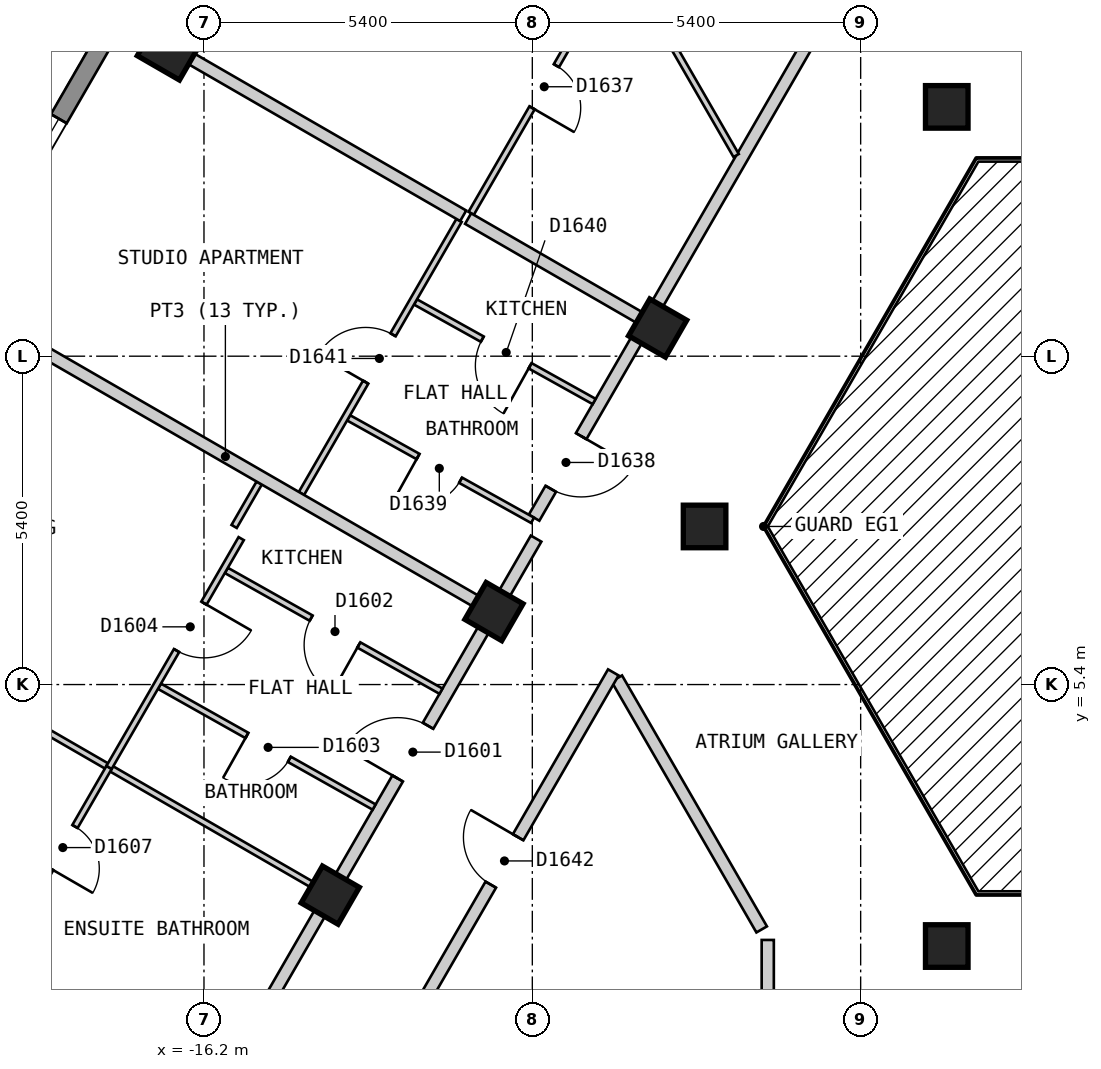
"""IFC4 building model, lengths in metres.
Left out: names, types, materials, properties, quantities, classifications, styles, units other than length and angle.
Written with IfcOpenShell. Run it as: python <this file> out.ifc"""

import sys

from ifc_helpers import new_model, si_unit, direction, frame, frame_2d, origin, origin_2d, place, context, subcontext, project, spatial, polyline, rectangle, outline, extrude, element, fill, save


model = new_model("IFC4")
c1 = context("Model", 3, precision=1e-05, world=origin(), true_north=direction((0.0, 1.0)))
c2 = subcontext(c1, "Body", "Model", "MODEL_VIEW")
j1 = project(units=[si_unit("LENGTHUNIT", "METRE"), si_unit("PLANEANGLEUNIT", "RADIAN")], contexts=[c1])
p1 = place(None, origin())
s1 = spatial("IfcSite", under=j1, at=p1, CompositionType="ELEMENT")
p2 = place(p1, origin())
s2 = spatial("IfcBuilding", under=s1, at=p2, CompositionType="ELEMENT")
p3 = place(p2, frame((0.0, 0.0, 169.2)))
s3 = spatial("IfcBuildingStorey", under=s2, at=p3, CompositionType="ELEMENT", Elevation=169.2)
p4 = place(p3, frame((-16.75, 15.888, 0.0), z_axis=(0.0, 0.0, 1.0), x_axis=(-0.5, -0.866025403784, 0.0)))
e1 = element("IfcColumn", 1, at=p4, inside=s3, PredefinedType="COLUMN", context=c2, shape_type="SweptSolid", body=[
    extrude(rectangle(XDim=0.8, YDim=0.8, at=origin_2d()), origin(), (0.0, 0.0, 1.0), 3.0),
])
for number, where, z_axis, x_axis in (
    (2, (-3.984, 14.9, 0.0), (0.0, 0.0, 1.0), (1.0, 0.0, 0.0)),
    (3, (-8.739, 11.263, 0.0), (0.0, 0.0, 1.0), (-0.5, -0.866, 0.0)),
    (4, (-7.967, 8.0, 0.0), (0.0, 0.0, 1.0), (1.0, 0.0, 0.0)),
    (5, (-11.431, 6.6, 0.0), (0.0, 0.0, 1.0), (-0.5, -0.866, 0.0)),
    (6, (-3.984, 1.1, 0.0), (0.0, 0.0, 1.0), (1.0, 0.0, 0.0)),
    (7, (-14.123, 1.937, 0.0), (0.0, 0.0, 1.0), (-0.5, -0.866, 0.0)),
):
    element("IfcColumn", number, at=place(p3, frame(where, z_axis=z_axis, x_axis=x_axis)), inside=s3, PredefinedType="COLUMN", context=c2, shape_type="SweptSolid", body=[
        extrude(rectangle(XDim=0.7, YDim=0.7, at=origin_2d()), origin(), (0.0, 0.0, 1.0), 3.0),
    ])
p5 = place(p3, frame((-14.592, 21.625, 0.0), z_axis=(0.0, 0.0, 1.0), x_axis=(-0.500010537973, -0.866019319597, 0.0)))
e8 = element("IfcWall", 8, at=p5, inside=s3, PredefinedType="SOLIDWALL", context=c2, shape_type="SweptSolid", body=[
    extrude(outline(polyline([(0.0, -0.15), (22.863, -0.15), (22.783, 0.15), (0.08, 0.15), (0.0, -0.15)])), origin(), (0.0, 0.0, 1.0), 2.7),
])
p6 = place(p5, frame((2.606, 0.0, 0.15)))
e9 = element("IfcOpeningElement", 9, at=p6, cuts=e8, PredefinedType="OPENING", context=c2, shape_type="SweptSolid", body=[
    extrude(rectangle(XDim=1.5, YDim=2.1, at=frame_2d((0.75, 1.05))), frame((0.0, 0.16, 0.0), z_axis=(0.0, -1.0, 0.0), x_axis=(1.0, 0.0, 0.0)), (0.0, 0.0, 1.0), 0.32),
])
p7 = place(p5, frame((7.99, 0.0, 0.15)))
e10 = element("IfcOpeningElement", 10, at=p7, cuts=e8, PredefinedType="OPENING", context=c2, shape_type="SweptSolid", body=[
    extrude(rectangle(XDim=1.5, YDim=2.1, at=frame_2d((0.75, 1.05))), frame((0.0, 0.16, 0.0), z_axis=(0.0, -1.0, 0.0), x_axis=(1.0, 0.0, 0.0)), (0.0, 0.0, 1.0), 0.32),
])
p8 = place(p5, frame((13.373, 0.0, 0.15)))
e11 = element("IfcOpeningElement", 11, at=p8, cuts=e8, PredefinedType="OPENING", context=c2, shape_type="SweptSolid", body=[
    extrude(rectangle(XDim=1.5, YDim=2.1, at=frame_2d((0.75, 1.05))), frame((0.0, 0.16, 0.0), z_axis=(0.0, -1.0, 0.0), x_axis=(1.0, 0.0, 0.0)), (0.0, 0.0, 1.0), 0.32),
])
p9 = place(p5, frame((18.758, 0.0, 0.15)))
e12 = element("IfcOpeningElement", 12, at=p9, cuts=e8, PredefinedType="OPENING", context=c2, shape_type="SweptSolid", body=[
    extrude(rectangle(XDim=1.5, YDim=2.1, at=frame_2d((0.75, 1.05))), frame((0.0, 0.16, 0.0), z_axis=(0.0, -1.0, 0.0), x_axis=(1.0, 0.0, 0.0)), (0.0, 0.0, 1.0), 0.32),
])
p10 = place(p3, frame((-9.411, 5.5, 0.0), z_axis=(0.0, 0.0, 1.0), x_axis=(0.500018099276, -0.86601495391, 0.0)))
e13 = element("IfcWall", 13, at=p10, inside=s3, PredefinedType="PARTITIONING", context=c2, shape_type="SweptSolid", body=[
    extrude(rectangle(XDim=4.765, YDim=0.2, at=frame_2d((2.383, 0.0))), origin(), (0.0, 0.0, 1.0), 2.7),
])
p11 = place(p3, frame((-13.048, -0.601, 0.0), z_axis=(0.0, 0.0, 1.0), x_axis=(0.499982180423, 0.866035691677, 0.0)))
e14 = element("IfcWall", 14, at=p11, inside=s3, PredefinedType="PARTITIONING", context=c2, shape_type="SweptSolid", body=[
    extrude(rectangle(XDim=7.16, YDim=0.2, at=frame_2d((3.58, 0.0))), origin(), (0.0, 0.0, 1.0), 2.7),
])
p12 = place(p11, frame((3.13, 0.0, 0.0)))
e15 = element("IfcOpeningElement", 15, at=p12, cuts=e14, PredefinedType="OPENING", context=c2, shape_type="SweptSolid", body=[
    extrude(rectangle(XDim=0.9, YDim=2.1, at=frame_2d((0.45, 1.05))), frame((0.0, 0.11, 0.0), z_axis=(0.0, -1.0, 0.0), x_axis=(1.0, 0.0, 0.0)), (0.0, 0.0, 1.0), 0.22),
])
p13 = place(p3, frame((-15.53, -0.501, 0.0), z_axis=(0.0, 0.0, 1.0), x_axis=(0.499952498232, 0.866052827206, 0.0)))
e16 = element("IfcWall", 16, at=p13, inside=s3, PredefinedType="PARTITIONING", context=c2, shape_type="SweptSolid", body=[
    extrude(rectangle(XDim=9.585, YDim=0.2, at=frame_2d((4.792, 0.0))), origin(), (0.0, 0.0, 1.0), 2.7),
])
p14 = place(p13, frame((5.031, 0.0, 0.0)))
e17 = element("IfcOpeningElement", 17, at=p14, cuts=e16, PredefinedType="OPENING", context=c2, shape_type="SweptSolid", body=[
    extrude(rectangle(XDim=1.0, YDim=2.1, at=frame_2d((0.5, 1.05))), frame((0.0, 0.11, 0.0), z_axis=(0.0, -1.0, 0.0), x_axis=(1.0, 0.0, 0.0)), (0.0, 0.0, 1.0), 0.22),
])
p15 = place(p3, frame((-10.771, 8.144, 0.0), z_axis=(0.0, 0.0, 1.0), x_axis=(0.500008507724, 0.866020491792, 0.0)))
e18 = element("IfcWall", 18, at=p15, inside=s3, PredefinedType="PARTITIONING", context=c2, shape_type="SweptSolid", body=[
    extrude(rectangle(XDim=10.688, YDim=0.2, at=frame_2d((5.344, 0.0))), origin(), (0.0, 0.0, 1.0), 2.7),
])
p16 = place(p15, frame((9.692, 0.0, 0.0)))
e19 = element("IfcOpeningElement", 19, at=p16, cuts=e18, PredefinedType="OPENING", context=c2, shape_type="SweptSolid", body=[
    extrude(rectangle(XDim=0.8, YDim=2.1, at=frame_2d((0.4, 1.05))), frame((0.0, 0.11, 0.0), z_axis=(0.0, -1.0, 0.0), x_axis=(1.0, 0.0, 0.0)), (0.0, 0.0, 1.0), 0.22),
])
p17 = place(p15, frame((0.549, 0.0, 0.0)))
e20 = element("IfcOpeningElement", 20, at=p17, cuts=e18, PredefinedType="OPENING", context=c2, shape_type="SweptSolid", body=[
    extrude(rectangle(XDim=1.0, YDim=2.1, at=frame_2d((0.5, 1.05))), frame((0.0, 0.11, 0.0), z_axis=(0.0, -1.0, 0.0), x_axis=(1.0, 0.0, 0.0)), (0.0, 0.0, 1.0), 0.22),
])
p18 = place(p3, frame((-6.928, -2.8, 0.0), z_axis=(0.0, 0.0, 1.0), x_axis=(0.0, 1.0, 0.0)))
e21 = element("IfcWall", 21, at=p18, inside=s3, PredefinedType="PARTITIONING", context=c2, shape_type="SweptSolid", body=[
    extrude(rectangle(XDim=4.0, YDim=0.2, at=frame_2d((2.0, 0.0))), origin(), (0.0, 0.0, 1.0), 2.7),
])
p19 = place(p3, frame((-12.721, 11.692, 0.0), z_axis=(0.0, 0.0, 1.0), x_axis=(0.873557394398, -0.486721150859, 0.0)))
e22 = element("IfcWall", 22, at=p19, inside=s3, PredefinedType="PARTITIONING", context=c2, shape_type="SweptSolid", body=[
    extrude(rectangle(XDim=3.363, YDim=0.1, at=frame_2d((1.682, 0.0))), origin(), (0.0, 0.0, 1.0), 2.7),
])
p20 = place(p19, frame((1.257, 0.0, 0.0)))
e23 = element("IfcOpeningElement", 23, at=p20, cuts=e22, PredefinedType="OPENING", context=c2, shape_type="SweptSolid", body=[
    extrude(rectangle(XDim=0.9, YDim=2.1, at=frame_2d((0.45, 1.05))), frame((0.0, 0.06, 0.0), z_axis=(0.0, -1.0, 0.0), x_axis=(1.0, 0.0, 0.0)), (0.0, 0.0, 1.0), 0.12),
])
p21 = place(p3, frame((-13.821, 9.786, 0.0), z_axis=(0.0, 0.0, 1.0), x_axis=(0.873644620966, -0.486564565353, 0.0)))
e24 = element("IfcWall", 24, at=p21, inside=s3, PredefinedType="PARTITIONING", context=c2, shape_type="SweptSolid", body=[
    extrude(rectangle(XDim=3.463, YDim=0.1, at=frame_2d((1.731, 0.0))), origin(), (0.0, 0.0, 1.0), 2.7),
])
p22 = place(p21, frame((1.307, 0.0, 0.0)))
e25 = element("IfcOpeningElement", 25, at=p22, cuts=e24, PredefinedType="OPENING", context=c2, shape_type="SweptSolid", body=[
    extrude(rectangle(XDim=0.8, YDim=2.1, at=frame_2d((0.4, 1.05))), frame((0.0, 0.06, 0.0), z_axis=(0.0, -1.0, 0.0), x_axis=(1.0, 0.0, 0.0)), (0.0, 0.0, 1.0), 0.12),
])
p23 = place(p3, frame((-16.932, 5.372, 0.0), z_axis=(0.0, 0.0, 1.0), x_axis=(0.871514356952, -0.490369988505, 0.0)))
e26 = element("IfcWall", 26, at=p23, inside=s3, PredefinedType="PARTITIONING", context=c2, shape_type="SweptSolid", body=[
    extrude(rectangle(XDim=4.05, YDim=0.1, at=frame_2d((2.025, 0.0))), origin(), (0.0, 0.0, 1.0), 2.7),
])
p24 = place(p23, frame((1.65, 0.0, 0.0)))
e27 = element("IfcOpeningElement", 27, at=p24, cuts=e26, PredefinedType="OPENING", context=c2, shape_type="SweptSolid", body=[
    extrude(rectangle(XDim=0.8, YDim=2.1, at=frame_2d((0.4, 1.05))), frame((0.0, 0.06, 0.0), z_axis=(0.0, -1.0, 0.0), x_axis=(1.0, 0.0, 0.0)), (0.0, 0.0, 1.0), 0.12),
])
p25 = place(p3, frame((-15.832, 7.277, 0.0), z_axis=(0.0, 0.0, 1.0), x_axis=(0.871528850672, -0.490344228523, 0.0)))
e28 = element("IfcWall", 28, at=p25, inside=s3, PredefinedType="PARTITIONING", context=c2, shape_type="SweptSolid", body=[
    extrude(rectangle(XDim=4.05, YDim=0.1, at=frame_2d((2.025, 0.0))), origin(), (0.0, 0.0, 1.0), 2.7),
])
p26 = place(p25, frame((1.6, 0.0, 0.0)))
e29 = element("IfcOpeningElement", 29, at=p26, cuts=e28, PredefinedType="OPENING", context=c2, shape_type="SweptSolid", body=[
    extrude(rectangle(XDim=0.9, YDim=2.1, at=frame_2d((0.45, 1.05))), frame((0.0, 0.06, 0.0), z_axis=(0.0, -1.0, 0.0), x_axis=(1.0, 0.0, 0.0)), (0.0, 0.0, 1.0), 0.12),
])
p27 = place(p3, frame((-22.87, 6.987, 0.0), z_axis=(0.0, 0.0, 1.0), x_axis=(0.866022959057, -0.500004234368, 0.0)))
e30 = element("IfcWall", 30, at=p27, inside=s3, PredefinedType="PARTITIONING", context=c2, shape_type="SweptSolid", body=[
    extrude(rectangle(XDim=10.0, YDim=0.1, at=frame_2d((5.0, 0.0))), origin(), (0.0, 0.0, 1.0), 2.7),
])
p28 = place(p27, frame((2.5, 0.0, 0.0)))
e31 = element("IfcOpeningElement", 31, at=p28, cuts=e30, PredefinedType="OPENING", context=c2, shape_type="SweptSolid", body=[
    extrude(rectangle(XDim=0.9, YDim=2.1, at=frame_2d((0.45, 1.05))), frame((0.0, 0.06, 0.0), z_axis=(0.0, -1.0, 0.0), x_axis=(1.0, 0.0, 0.0)), (0.0, 0.0, 1.0), 0.12),
])
p29 = place(p3, frame((-11.806, 13.149, 0.0), z_axis=(0.0, 0.0, 1.0), x_axis=(0.499932199895, 0.866064544655, 0.0)))
e32 = element("IfcWall", 32, at=p29, inside=s3, PredefinedType="PARTITIONING", context=c2, shape_type="SweptSolid", body=[
    extrude(rectangle(XDim=8.833, YDim=0.1, at=frame_2d((4.417, 0.0))), origin(), (0.0, 0.0, 1.0), 2.7),
])
p30 = place(p29, frame((6.413, 0.0, 0.0)))
e33 = element("IfcOpeningElement", 33, at=p30, cuts=e32, PredefinedType="OPENING", context=c2, shape_type="SweptSolid", body=[
    extrude(rectangle(XDim=0.9, YDim=2.1, at=frame_2d((0.45, 1.05))), frame((0.0, 0.06, 0.0), z_axis=(0.0, -1.0, 0.0), x_axis=(1.0, 0.0, 0.0)), (0.0, 0.0, 1.0), 0.12),
])
p31 = place(p29, frame((2.004, 0.0, 0.0)))
e34 = element("IfcOpeningElement", 34, at=p31, cuts=e32, PredefinedType="OPENING", context=c2, shape_type="SweptSolid", body=[
    extrude(rectangle(XDim=0.8, YDim=2.1, at=frame_2d((0.4, 1.05))), frame((0.0, 0.06, 0.0), z_axis=(0.0, -1.0, 0.0), x_axis=(1.0, 0.0, 0.0)), (0.0, 0.0, 1.0), 0.12),
])
p32 = place(p3, frame((-14.597, 8.543, 0.0), z_axis=(0.0, 0.0, 1.0), x_axis=(0.499962957901, 0.866046788994, 0.0)))
e35 = element("IfcWall", 35, at=p32, inside=s3, PredefinedType="PARTITIONING", context=c2, shape_type="SweptSolid", body=[
    extrude(rectangle(XDim=5.185, YDim=0.1, at=frame_2d((2.592, 0.0))), origin(), (0.0, 0.0, 1.0), 2.7),
])
p33 = place(p32, frame((2.113, 0.0, 0.0)))
e36 = element("IfcOpeningElement", 36, at=p33, cuts=e35, PredefinedType="OPENING", context=c2, shape_type="SweptSolid", body=[
    extrude(rectangle(XDim=0.9, YDim=2.1, at=frame_2d((0.45, 1.05))), frame((0.0, 0.06, 0.0), z_axis=(0.0, -1.0, 0.0), x_axis=(1.0, 0.0, 0.0)), (0.0, 0.0, 1.0), 0.12),
])
p34 = place(p3, frame((-19.283, 1.4, 0.0), z_axis=(0.0, 0.0, 1.0), x_axis=(0.499847391584, 0.866113494368, 0.0)))
e37 = element("IfcWall", 37, at=p34, inside=s3, PredefinedType="PARTITIONING", context=c2, shape_type="SweptSolid", body=[
    extrude(rectangle(XDim=3.045, YDim=0.1, at=frame_2d((1.522, 0.0))), origin(), (0.0, 0.0, 1.0), 2.7),
])
p35 = place(p34, frame((1.123, 0.0, 0.0)))
e38 = element("IfcOpeningElement", 38, at=p35, cuts=e37, PredefinedType="OPENING", context=c2, shape_type="SweptSolid", body=[
    extrude(rectangle(XDim=0.8, YDim=2.1, at=frame_2d((0.4, 1.05))), frame((0.0, 0.06, 0.0), z_axis=(0.0, -1.0, 0.0), x_axis=(1.0, 0.0, 0.0)), (0.0, 0.0, 1.0), 0.12),
])
p36 = place(p3, frame((-15.704, 8.0, 0.0), z_axis=(0.0, 0.0, 1.0), x_axis=(0.499833531678, 0.866121492985, 0.0)))
e39 = element("IfcWall", 39, at=p36, inside=s3, PredefinedType="PARTITIONING", context=c2, shape_type="SweptSolid", body=[
    extrude(rectangle(XDim=0.824, YDim=0.1, at=frame_2d((0.412, 0.0))), origin(), (0.0, 0.0, 1.0), 2.7),
])
p37 = place(p3, frame((-20.178, 11.65, 0.0), z_axis=(0.0, 0.0, 1.0), x_axis=(0.866016855193, -0.500014806302, 0.0)))
e40 = element("IfcWall", 40, at=p37, inside=s3, PredefinedType="PARTITIONING", context=c2, shape_type="SweptSolid", body=[
    extrude(rectangle(XDim=10.0, YDim=0.2, at=frame_2d((5.0, 0.0))), origin(), (0.0, 0.0, 1.0), 2.7),
])
p38 = place(p3, frame((-17.486, 16.313, 0.0), z_axis=(0.0, 0.0, 1.0), x_axis=(0.866002210665, -0.500040169509, 0.0)))
e41 = element("IfcWall", 41, at=p38, inside=s3, PredefinedType="PARTITIONING", context=c2, shape_type="SweptSolid", body=[
    extrude(rectangle(XDim=6.408, YDim=0.2, at=frame_2d((3.204, 0.0))), origin(), (0.0, 0.0, 1.0), 2.7),
])
p39 = place(p3, frame((-11.856, 13.063, 0.0), z_axis=(0.0, 0.0, 1.0), x_axis=(0.865966208357, -0.500102515474, 0.0)))
e42 = element("IfcWall", 42, at=p39, inside=s3, PredefinedType="PARTITIONING", context=c2, shape_type="SweptSolid", body=[
    extrude(rectangle(XDim=3.299, YDim=0.2, at=frame_2d((1.649, 0.0))), origin(), (0.0, 0.0, 1.0), 2.7),
])
p40 = place(p3, frame((-9.352, 17.4, 0.0), z_axis=(0.0, 0.0, 1.0), x_axis=(0.499785326313, -0.866149310225, 0.0)))
e43 = element("IfcWall", 43, at=p40, inside=s3, PredefinedType="PARTITIONING", context=c2, shape_type="SweptSolid", body=[
    extrude(rectangle(XDim=3.81, YDim=0.1, at=frame_2d((1.905, 0.0))), origin(), (0.0, 0.0, 1.0), 2.7),
])
p41 = place(p3, frame((-17.761, 4.037, 0.0), z_axis=(0.0, 0.0, 1.0), x_axis=(0.50009692756, 0.865969435399, 0.0)))
e44 = element("IfcWall", 44, at=p41, inside=s3, PredefinedType="PARTITIONING", context=c2, shape_type="SweptSolid", body=[
    extrude(rectangle(XDim=4.345, YDim=0.1, at=frame_2d((2.173, 0.0))), origin(), (0.0, 0.0, 1.0), 2.7),
])
p42 = place(p41, frame((2.22, 0.0, 0.0)))
e45 = element("IfcOpeningElement", 45, at=p42, cuts=e44, PredefinedType="OPENING", context=c2, shape_type="SweptSolid", body=[
    extrude(rectangle(XDim=0.9, YDim=2.1, at=frame_2d((0.45, 1.05))), frame((0.0, 0.06, 0.0), z_axis=(0.0, -1.0, 0.0), x_axis=(1.0, 0.0, 0.0)), (0.0, 0.0, 1.0), 0.12),
])
p43 = place(p7, origin())
e46 = element("IfcWindow", 46, at=p43, inside=s3, PartitioningType="SINGLE_PANEL", PredefinedType="WINDOW", context=c2, shape_type="SweptSolid", body=[
    extrude(rectangle(XDim=1.5, YDim=2.1, at=frame_2d((0.75, 1.05))), frame((0.0, 0.03, 0.0), z_axis=(0.0, -1.0, 0.0), x_axis=(1.0, 0.0, 0.0)), (0.0, 0.0, 1.0), 0.06),
])
fill(e10, e46)
p44 = place(p14, origin())
e47 = element("IfcDoor", 47, at=p44, inside=s3, OperationType="SINGLE_SWING_LEFT", PredefinedType="DOOR", context=c2, shape_type="SweptSolid", body=[
    extrude(rectangle(XDim=1.0, YDim=2.1, at=frame_2d((0.5, 1.05))), frame((0.0, 0.025, 0.0), z_axis=(0.0, -1.0, 0.0), x_axis=(1.0, 0.0, 0.0)), (0.0, 0.0, 1.0), 0.05),
])
fill(e17, e47)
p45 = place(p26, origin())
e48 = element("IfcDoor", 48, at=p45, inside=s3, OperationType="SINGLE_SWING_RIGHT", PredefinedType="DOOR", context=c2, shape_type="SweptSolid", body=[
    extrude(rectangle(XDim=0.9, YDim=2.1, at=frame_2d((0.45, 1.05))), frame((0.0, 0.025, 0.0), z_axis=(0.0, -1.0, 0.0), x_axis=(1.0, 0.0, 0.0)), (0.0, 0.0, 1.0), 0.05),
])
fill(e29, e48)
p46 = place(p24, origin())
e49 = element("IfcDoor", 49, at=p46, inside=s3, OperationType="SINGLE_SWING_LEFT", PredefinedType="DOOR", context=c2, shape_type="SweptSolid", body=[
    extrude(rectangle(XDim=0.8, YDim=2.1, at=frame_2d((0.4, 1.05))), frame((0.0, 0.025, 0.0), z_axis=(0.0, -1.0, 0.0), x_axis=(1.0, 0.0, 0.0)), (0.0, 0.0, 1.0), 0.05),
])
fill(e27, e49)
p47 = place(p42, origin())
e50 = element("IfcDoor", 50, at=p47, inside=s3, OperationType="SINGLE_SWING_RIGHT", PredefinedType="DOOR", context=c2, shape_type="SweptSolid", body=[
    extrude(rectangle(XDim=0.9, YDim=2.1, at=frame_2d((0.45, 1.05))), frame((0.0, 0.025, 0.0), z_axis=(0.0, -1.0, 0.0), x_axis=(1.0, 0.0, 0.0)), (0.0, 0.0, 1.0), 0.05),
])
fill(e45, e50)
p48 = place(p35, origin())
e51 = element("IfcDoor", 51, at=p48, inside=s3, OperationType="SINGLE_SWING_LEFT", PredefinedType="DOOR", context=c2, shape_type="SweptSolid", body=[
    extrude(rectangle(XDim=0.8, YDim=2.1, at=frame_2d((0.4, 1.05))), frame((0.0, 0.025, 0.0), z_axis=(0.0, -1.0, 0.0), x_axis=(1.0, 0.0, 0.0)), (0.0, 0.0, 1.0), 0.05),
])
fill(e38, e51)
p49 = place(p31, origin())
e52 = element("IfcDoor", 52, at=p49, inside=s3, OperationType="SINGLE_SWING_LEFT", PredefinedType="DOOR", context=c2, shape_type="SweptSolid", body=[
    extrude(rectangle(XDim=0.8, YDim=2.1, at=frame_2d((0.4, 1.05))), frame((0.0, 0.025, 0.0), z_axis=(0.0, -1.0, 0.0), x_axis=(1.0, 0.0, 0.0)), (0.0, 0.0, 1.0), 0.05),
])
fill(e34, e52)
p50 = place(p17, origin())
e53 = element("IfcDoor", 53, at=p50, inside=s3, OperationType="SINGLE_SWING_RIGHT", PredefinedType="DOOR", context=c2, shape_type="SweptSolid", body=[
    extrude(rectangle(XDim=1.0, YDim=2.1, at=frame_2d((0.5, 1.05))), frame((0.0, 0.025, 0.0), z_axis=(0.0, -1.0, 0.0), x_axis=(1.0, 0.0, 0.0)), (0.0, 0.0, 1.0), 0.05),
])
fill(e20, e53)
p51 = place(p22, origin())
e54 = element("IfcDoor", 54, at=p51, inside=s3, OperationType="SINGLE_SWING_LEFT", PredefinedType="DOOR", context=c2, shape_type="SweptSolid", body=[
    extrude(rectangle(XDim=0.8, YDim=2.1, at=frame_2d((0.4, 1.05))), frame((0.0, 0.025, 0.0), z_axis=(0.0, -1.0, 0.0), x_axis=(1.0, 0.0, 0.0)), (0.0, 0.0, 1.0), 0.05),
])
fill(e25, e54)
p52 = place(p20, origin())
e55 = element("IfcDoor", 55, at=p52, inside=s3, OperationType="SINGLE_SWING_RIGHT", PredefinedType="DOOR", context=c2, shape_type="SweptSolid", body=[
    extrude(rectangle(XDim=0.9, YDim=2.1, at=frame_2d((0.45, 1.05))), frame((0.0, 0.025, 0.0), z_axis=(0.0, -1.0, 0.0), x_axis=(1.0, 0.0, 0.0)), (0.0, 0.0, 1.0), 0.05),
])
fill(e23, e55)
p53 = place(p33, origin())
e56 = element("IfcDoor", 56, at=p53, inside=s3, OperationType="SINGLE_SWING_LEFT", PredefinedType="DOOR", context=c2, shape_type="SweptSolid", body=[
    extrude(rectangle(XDim=0.9, YDim=2.1, at=frame_2d((0.45, 1.05))), frame((0.0, 0.025, 0.0), z_axis=(0.0, -1.0, 0.0), x_axis=(1.0, 0.0, 0.0)), (0.0, 0.0, 1.0), 0.05),
])
fill(e36, e56)
p54 = place(p12, origin())
e57 = element("IfcDoor", 57, at=p54, inside=s3, OperationType="SINGLE_SWING_RIGHT", PredefinedType="DOOR", context=c2, shape_type="SweptSolid", body=[
    extrude(rectangle(XDim=0.9, YDim=2.1, at=frame_2d((0.45, 1.05))), frame((0.0, 0.025, 0.0), z_axis=(0.0, -1.0, 0.0), x_axis=(1.0, 0.0, 0.0)), (0.0, 0.0, 1.0), 0.05),
])
fill(e15, e57)
save(model, sys.argv[1])
